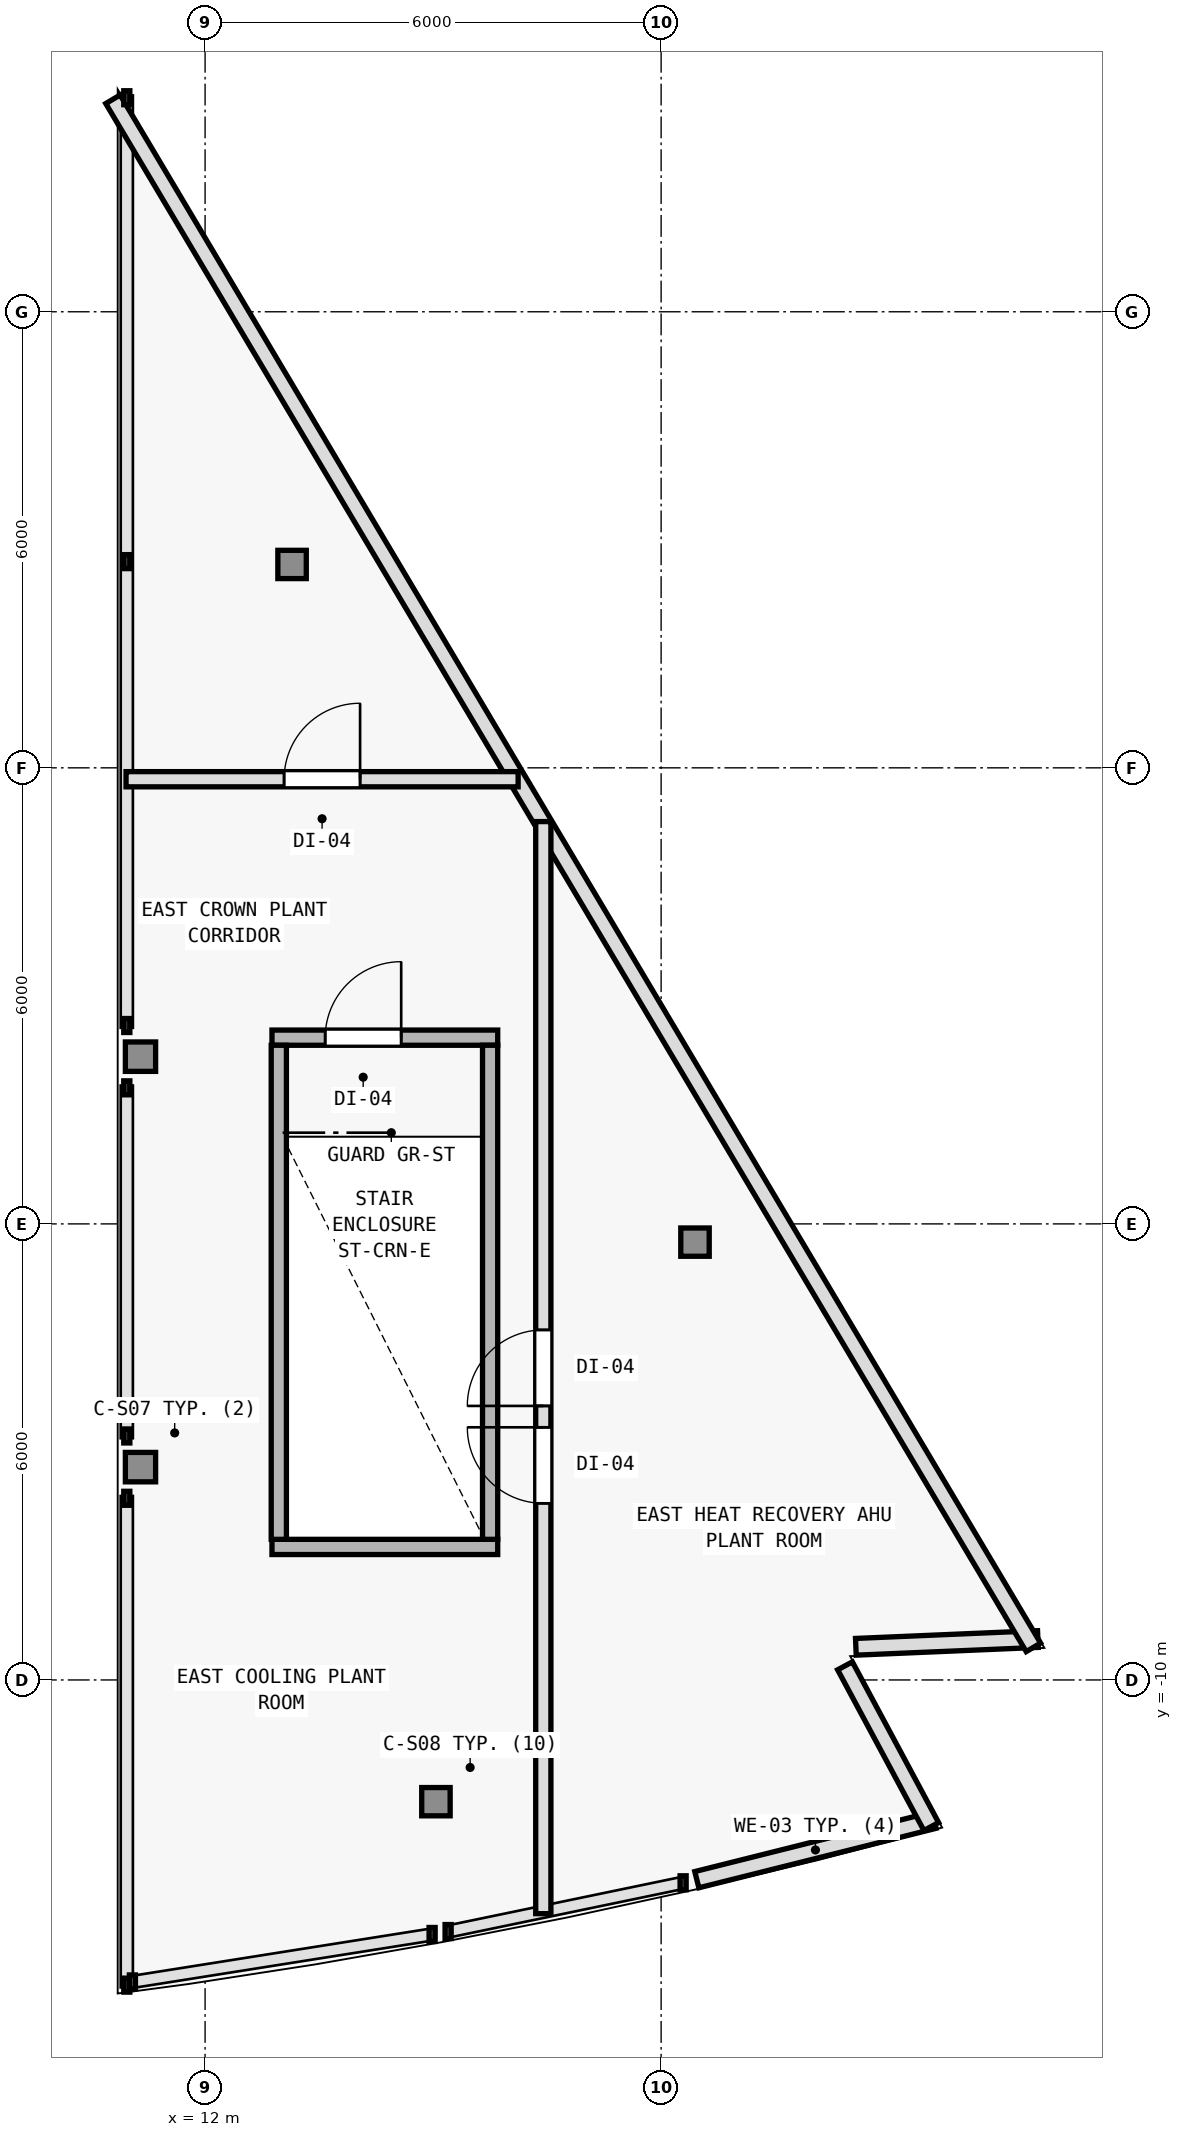
"""IFC4 building model, lengths in metres.
Left out: names, types, materials, properties, quantities, classifications, styles, units other than length and angle.
Written with IfcOpenShell. Run it as: python <this file> out.ifc"""

import sys

from ifc_helpers import new_model, si_unit, direction, frame, frame_2d, origin, origin_2d, place, context, subcontext, project, spatial, rectangle, i_section, extrude, element, fill, save


model = new_model("IFC4")
c1 = context("Model", 3, precision=1e-05, world=origin(), true_north=direction((0.0, 1.0)))
c2 = subcontext(c1, "Body", "Model", "MODEL_VIEW")
j1 = project(units=[si_unit("LENGTHUNIT", "METRE"), si_unit("PLANEANGLEUNIT", "RADIAN")], contexts=[c1])
p1 = place(None, origin())
s1 = spatial("IfcSite", under=j1, at=p1, CompositionType="ELEMENT")
p2 = place(p1, origin())
s2 = spatial("IfcBuilding", under=s1, at=p2, CompositionType="ELEMENT")
p3 = place(p2, frame((0.0, 0.0, 312.0)))
s3 = spatial("IfcBuildingStorey", under=s2, at=p3, CompositionType="ELEMENT", Elevation=312.0)
for number, where, z_axis, x_axis in (
    (1, (11.15, -7.2, 0.0), (0.0, 0.0, 1.0), (1.0, 0.0, 0.0)),
    (2, (11.15, -1.8, 0.0), (0.0, 0.0, 1.0), (1.0, 0.0, 0.0)),
):
    element("IfcColumn", number, at=place(p3, frame(where, z_axis=z_axis, x_axis=x_axis)), inside=s3, PredefinedType="COLUMN", context=c2, shape_type="SweptSolid", body=[
        extrude(i_section(OverallWidth=0.398, OverallDepth=0.387, WebThickness=0.013, FlangeThickness=0.022, FilletRadius=0.015, at=origin_2d()), origin(), (0.0, 0.0, 1.0), 3.6),
    ])
p4 = place(p3, frame((15.037, -11.602, 0.0), z_axis=(0.0, 0.0, 1.0), x_axis=(1.0, 0.0, 0.0)))
e3 = element("IfcColumn", 3, at=p4, inside=s3, PredefinedType="COLUMN", context=c2, shape_type="SweptSolid", body=[
    extrude(i_section(OverallWidth=0.374, OverallDepth=0.372, WebThickness=0.012, FlangeThickness=0.02, FilletRadius=0.015, at=origin_2d()), origin(), (0.0, 0.0, 1.0), 3.095),
])
p5 = place(p3, frame((18.446, -4.24, 0.0), z_axis=(0.0, 0.0, 1.0), x_axis=(1.0, 0.0, 0.0)))
e4 = element("IfcColumn", 4, at=p5, inside=s3, PredefinedType="COLUMN", context=c2, shape_type="SweptSolid", body=[
    extrude(i_section(OverallWidth=0.374, OverallDepth=0.372, WebThickness=0.012, FlangeThickness=0.02, FilletRadius=0.015, at=origin_2d()), origin(), (0.0, 0.0, 1.0), 1.919),
])
p6 = place(p3, frame((13.144, 4.676, 0.0), z_axis=(0.0, 0.0, 1.0), x_axis=(1.0, 0.0, 0.0)))
e5 = element("IfcColumn", 5, at=p6, inside=s3, PredefinedType="COLUMN", context=c2, shape_type="SweptSolid", body=[
    extrude(i_section(OverallWidth=0.374, OverallDepth=0.372, WebThickness=0.012, FlangeThickness=0.02, FilletRadius=0.015, at=origin_2d()), origin(), (0.0, 0.0, 1.0), 3.6),
])
p7 = place(p3, frame((21.591, -11.845, 0.0), z_axis=(0.0, 0.0, 1.0), x_axis=(-0.969999506412, -0.243106885055, 0.0)))
e6 = element("IfcWall", 6, at=p7, inside=s3, PredefinedType="SOLIDWALL", context=c2, shape_type="SweptSolid", body=[
    extrude(rectangle(XDim=3.218, YDim=0.22, at=frame_2d((1.609, 0.0))), origin(), (0.0, 0.0, 1.0), 1.353),
])
p8 = place(p3, frame((20.419, -9.814, 0.0), z_axis=(0.0, 0.0, 1.0), x_axis=(0.472788803636, -0.881175775402, 0.0)))
e7 = element("IfcWall", 7, at=p8, inside=s3, PredefinedType="SOLIDWALL", context=c2, shape_type="SweptSolid", body=[
    extrude(rectangle(XDim=2.4, YDim=0.22, at=frame_2d((1.2, 0.0))), origin(), (0.0, 0.0, 1.0), 1.023),
])
p9 = place(p3, frame((22.957, -9.462, 0.0), z_axis=(0.0, 0.0, 1.0), x_axis=(-0.999097772539, -0.042469293695, 0.0)))
e8 = element("IfcWall", 8, at=p9, inside=s3, PredefinedType="SOLIDWALL", context=c2, shape_type="SweptSolid", body=[
    extrude(rectangle(XDim=2.397, YDim=0.22, at=frame_2d((1.199, 0.0))), origin(), (0.0, 0.0, 1.0), 0.756),
])
p10 = place(p3, frame((10.788, 10.796, 0.0), z_axis=(0.0, 0.0, 1.0), x_axis=(0.511091645531, -0.859526224073, 0.0)))
e9 = element("IfcWall", 9, at=p10, inside=s3, PredefinedType="SOLIDWALL", context=c2, shape_type="SweptSolid", body=[
    extrude(rectangle(XDim=23.696, YDim=0.22, at=frame_2d((11.848, 0.0))), origin(), (0.0, 0.0, 1.0), 2.452),
])
p11 = place(p3, frame((12.88, -8.25, 0.0), z_axis=(0.0, 0.0, 1.0), x_axis=(1.0, 0.0, 0.0)))
e10 = element("IfcWall", 10, at=p11, inside=s3, PredefinedType="SOLIDWALL", context=c2, shape_type="SweptSolid", body=[
    extrude(rectangle(XDim=2.97, YDim=0.2, at=frame_2d((1.485, 0.0))), origin(), (0.0, 0.0, 1.0), 2.755),
])
p12 = place(p3, frame((12.88, -1.55, 0.0), z_axis=(0.0, 0.0, 1.0), x_axis=(1.0, 0.0, 0.0)))
e11 = element("IfcWall", 11, at=p12, inside=s3, PredefinedType="SOLIDWALL", context=c2, shape_type="SweptSolid", body=[
    extrude(rectangle(XDim=2.97, YDim=0.2, at=frame_2d((1.485, 0.0))), origin(), (0.0, 0.0, 1.0), 2.755),
])
p13 = place(p12, frame((0.7, 0.0, 0.0)))
e12 = element("IfcOpeningElement", 12, at=p13, cuts=e11, PredefinedType="OPENING", context=c2, shape_type="SweptSolid", body=[
    extrude(rectangle(XDim=1.0, YDim=2.15, at=frame_2d((0.5, 1.075))), frame((0.0, 0.11, 0.0), z_axis=(0.0, -1.0, 0.0), x_axis=(1.0, 0.0, 0.0)), (0.0, 0.0, 1.0), 0.22),
])
p14 = place(p3, frame((12.97, -8.15, 0.0), z_axis=(0.0, 0.0, 1.0), x_axis=(0.0, 1.0, 0.0)))
e13 = element("IfcWall", 13, at=p14, inside=s3, PredefinedType="SOLIDWALL", context=c2, shape_type="SweptSolid", body=[
    extrude(rectangle(XDim=6.5, YDim=0.2, at=frame_2d((3.25, 0.0))), origin(), (0.0, 0.0, 1.0), 3.34),
])
p15 = place(p3, frame((15.75, -8.15, 0.0), z_axis=(0.0, 0.0, 1.0), x_axis=(0.0, 1.0, 0.0)))
e14 = element("IfcWall", 14, at=p15, inside=s3, PredefinedType="SOLIDWALL", context=c2, shape_type="SweptSolid", body=[
    extrude(rectangle(XDim=6.5, YDim=0.2, at=frame_2d((3.25, 0.0))), origin(), (0.0, 0.0, 1.0), 2.79),
])
p16 = place(p3, frame((16.45, -13.075, 0.0), z_axis=(0.0, 0.0, 1.0), x_axis=(0.0, 1.0, 0.0)))
e15 = element("IfcWall", 15, at=p16, inside=s3, PredefinedType="SOLIDWALL", context=c2, shape_type="SweptSolid", body=[
    extrude(rectangle(XDim=14.368, YDim=0.2, at=frame_2d((7.184, 0.0))), origin(), (0.0, 0.0, 1.0), 2.548),
])
p17 = place(p16, frame((5.399, 0.0, 0.0)))
e16 = element("IfcOpeningElement", 16, at=p17, cuts=e15, PredefinedType="OPENING", context=c2, shape_type="SweptSolid", body=[
    extrude(rectangle(XDim=1.0, YDim=2.15, at=frame_2d((0.5, 1.075))), frame((0.0, 0.11, 0.0), z_axis=(0.0, -1.0, 0.0), x_axis=(1.0, 0.0, 0.0)), (0.0, 0.0, 1.0), 0.22),
])
p18 = place(p16, frame((6.68, 0.0, 0.0)))
e17 = element("IfcOpeningElement", 17, at=p18, cuts=e15, PredefinedType="OPENING", context=c2, shape_type="SweptSolid", body=[
    extrude(rectangle(XDim=1.0, YDim=2.15, at=frame_2d((0.5, 1.075))), frame((0.0, 0.11, 0.0), z_axis=(0.0, -1.0, 0.0), x_axis=(1.0, 0.0, 0.0)), (0.0, 0.0, 1.0), 0.22),
])
p19 = place(p3, frame((10.96, 1.85, 0.0), z_axis=(0.0, 0.0, 1.0), x_axis=(1.0, 0.0, 0.0)))
e18 = element("IfcWall", 18, at=p19, inside=s3, PredefinedType="SOLIDWALL", context=c2, shape_type="SweptSolid", body=[
    extrude(rectangle(XDim=5.159, YDim=0.2, at=frame_2d((2.579, 0.0))), origin(), (0.0, 0.0, 1.0), 2.662),
])
p20 = place(p19, frame((2.079, 0.0, 0.0)))
e19 = element("IfcOpeningElement", 19, at=p20, cuts=e18, PredefinedType="OPENING", context=c2, shape_type="SweptSolid", body=[
    extrude(rectangle(XDim=1.0, YDim=2.15, at=frame_2d((0.5, 1.075))), frame((0.0, 0.11, 0.0), z_axis=(0.0, -1.0, 0.0), x_axis=(1.0, 0.0, 0.0)), (0.0, 0.0, 1.0), 0.22),
])
p21 = place(p13, origin())
e20 = element("IfcDoor", 20, at=p21, inside=s3, OperationType="SINGLE_SWING_RIGHT", PredefinedType="DOOR", context=c2, shape_type="SweptSolid", body=[
    extrude(rectangle(XDim=1.0, YDim=2.15, at=frame_2d((0.5, 1.075))), frame((0.0, 0.025, 0.0), z_axis=(0.0, -1.0, 0.0), x_axis=(1.0, 0.0, 0.0)), (0.0, 0.0, 1.0), 0.05),
])
fill(e12, e20)
p22 = place(p17, origin())
e21 = element("IfcDoor", 21, at=p22, inside=s3, OperationType="SINGLE_SWING_RIGHT", PredefinedType="DOOR", context=c2, shape_type="SweptSolid", body=[
    extrude(rectangle(XDim=1.0, YDim=2.15, at=frame_2d((0.5, 1.075))), frame((0.0, 0.025, 0.0), z_axis=(0.0, -1.0, 0.0), x_axis=(1.0, 0.0, 0.0)), (0.0, 0.0, 1.0), 0.05),
])
fill(e16, e21)
p23 = place(p18, origin())
e22 = element("IfcDoor", 22, at=p23, inside=s3, OperationType="SINGLE_SWING_LEFT", PredefinedType="DOOR", context=c2, shape_type="SweptSolid", body=[
    extrude(rectangle(XDim=1.0, YDim=2.15, at=frame_2d((0.5, 1.075))), frame((0.0, 0.025, 0.0), z_axis=(0.0, -1.0, 0.0), x_axis=(1.0, 0.0, 0.0)), (0.0, 0.0, 1.0), 0.05),
])
fill(e17, e22)
p24 = place(p20, origin())
e23 = element("IfcDoor", 23, at=p24, inside=s3, OperationType="SINGLE_SWING_RIGHT", PredefinedType="DOOR", context=c2, shape_type="SweptSolid", body=[
    extrude(rectangle(XDim=1.0, YDim=2.15, at=frame_2d((0.5, 1.075))), frame((0.0, 0.025, 0.0), z_axis=(0.0, -1.0, 0.0), x_axis=(1.0, 0.0, 0.0)), (0.0, 0.0, 1.0), 0.05),
])
fill(e19, e23)
save(model, sys.argv[1])
